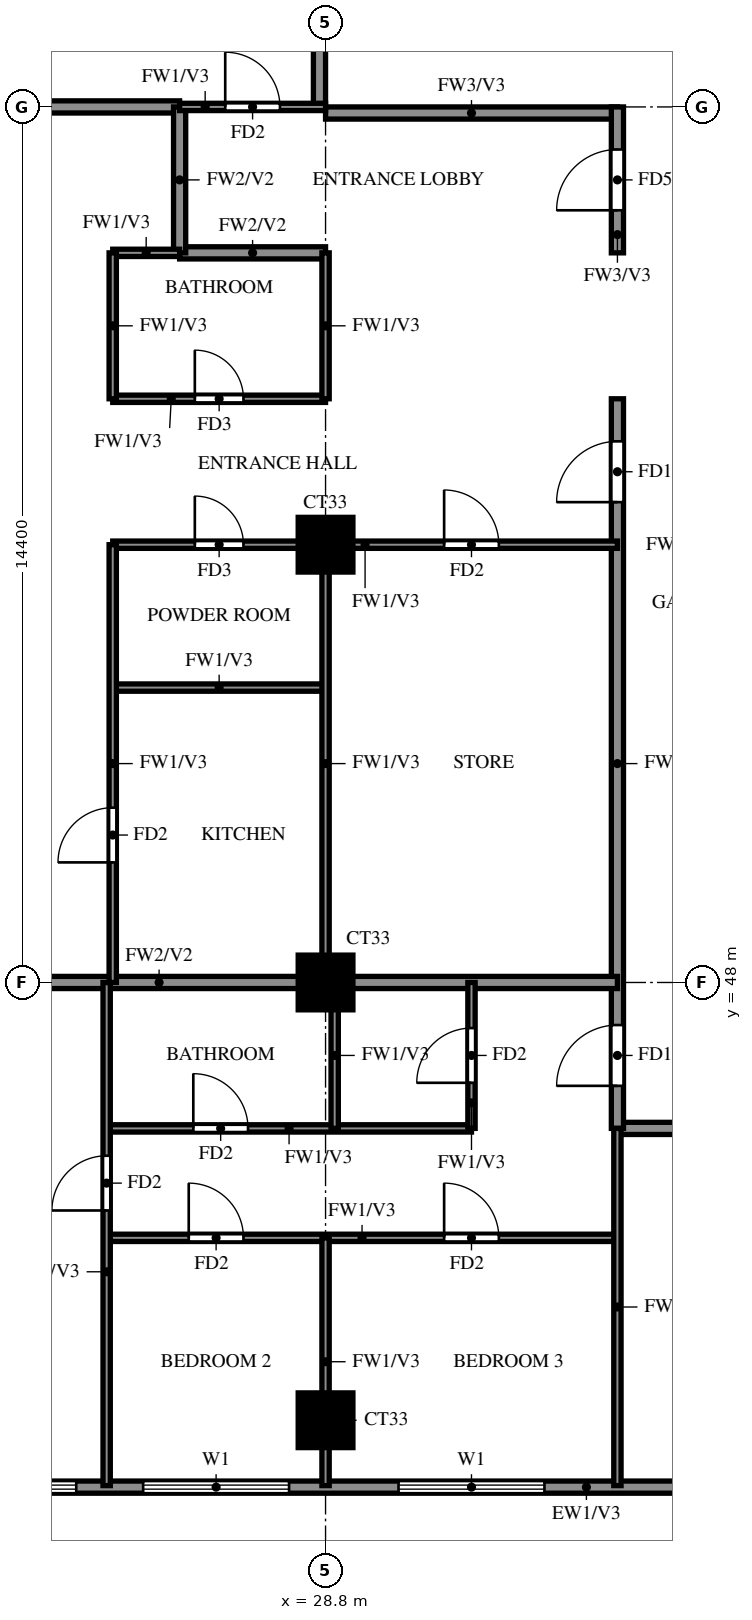
"""IFC4 building model, lengths in metres.
Left out: names, types, materials, properties, quantities, classifications, styles, units other than length and angle.
Written with IfcOpenShell. Run it as: python <this file> out.ifc"""

import sys

from ifc_helpers import new_model, si_unit, direction, frame, frame_2d, origin, origin_2d, place, context, subcontext, project, spatial, rectangle, extrude, source, transform, mapped, element, fill, save


model = new_model("IFC4")
c1 = context("Model", 3, precision=1e-05, world=origin(), true_north=direction((0.0, 1.0)))
c2 = subcontext(c1, "Body", "Model", "MODEL_VIEW")
j1 = project(units=[si_unit("LENGTHUNIT", "METRE"), si_unit("PLANEANGLEUNIT", "RADIAN")], contexts=[c1])
p1 = place(None, origin())
s1 = spatial("IfcSite", under=j1, at=p1, CompositionType="ELEMENT")
p2 = place(p1, origin())
s2 = spatial("IfcBuilding", under=s1, at=p2, CompositionType="ELEMENT")
p3 = place(p2, frame((0.0, 0.0, 229.0)))
s3 = spatial("IfcBuildingStorey", under=s2, at=p3, CompositionType="ELEMENT", Elevation=229.0)
m1 = source(origin(), c2, "Body", "SweptSolid", [
    extrude(rectangle(XDim=0.9, YDim=0.9, at=origin_2d()), origin(), (0.0, 0.0, 1.0), 3.22),
])
for number, where, z_axis, x_axis in (
    (1, (28.8, 40.8, 0.0), (0.0, 0.0, 1.0), (1.0, 0.0, 0.0)),
    (2, (28.8, 48.0, 0.0), (0.0, 0.0, 1.0), (1.0, 0.0, 0.0)),
    (3, (28.8, 55.2, 0.0), (0.0, 0.0, 1.0), (1.0, 0.0, 0.0)),
):
    element("IfcColumn", number, at=place(p3, frame(where, z_axis=z_axis, x_axis=x_axis)), inside=s3, PredefinedType="COLUMN", context=c2, shape_type="MappedRepresentation", body=[
        mapped(m1, transform((0.0, 0.0, 0.0))),
    ])
p4 = place(p3, frame((22.2, 39.7, 0.0), z_axis=(0.0, 0.0, 1.0), x_axis=(1.0, 0.0, 0.0)))
e4 = element("IfcWall", 4, at=p4, inside=s3, PredefinedType="SOLIDWALL", context=c2, shape_type="SweptSolid", body=[
    extrude(rectangle(XDim=19.8, YDim=0.2, at=frame_2d((9.9, 0.0))), origin(), (0.0, 0.0, 1.0), 3.22),
])
p5 = place(p4, frame((0.7, 0.0, 0.6)))
e5 = element("IfcOpeningElement", 5, at=p5, cuts=e4, PredefinedType="OPENING", context=c2, shape_type="SweptSolid", body=[
    extrude(rectangle(XDim=1.8, YDim=2.4, at=frame_2d((0.9, 1.2))), frame((0.0, 0.11, 0.0), z_axis=(0.0, -1.0, 0.0), x_axis=(1.0, 0.0, 0.0)), (0.0, 0.0, 1.0), 0.22),
])
p6 = place(p4, frame((3.6, 0.0, 0.6)))
e6 = element("IfcOpeningElement", 6, at=p6, cuts=e4, PredefinedType="OPENING", context=c2, shape_type="SweptSolid", body=[
    extrude(rectangle(XDim=2.4, YDim=2.4, at=frame_2d((1.2, 1.2))), frame((0.0, 0.11, 0.0), z_axis=(0.0, -1.0, 0.0), x_axis=(1.0, 0.0, 0.0)), (0.0, 0.0, 1.0), 0.22),
])
p7 = place(p4, frame((7.8, 0.0, 0.6)))
e7 = element("IfcOpeningElement", 7, at=p7, cuts=e4, PredefinedType="OPENING", context=c2, shape_type="SweptSolid", body=[
    extrude(rectangle(XDim=2.4, YDim=2.4, at=frame_2d((1.2, 1.2))), frame((0.0, 0.11, 0.0), z_axis=(0.0, -1.0, 0.0), x_axis=(1.0, 0.0, 0.0)), (0.0, 0.0, 1.0), 0.22),
])
p8 = place(p3, frame((33.6, 45.6, 0.0), z_axis=(0.0, 0.0, 1.0), x_axis=(1.0, 0.0, 0.0)))
e8 = element("IfcWall", 8, at=p8, inside=s3, PredefinedType="SOLIDWALL", context=c2, shape_type="SweptSolid", body=[
    extrude(rectangle(XDim=7.2, YDim=0.2, at=frame_2d((3.6, 0.0))), origin(), (0.0, 0.0, 1.0), 3.22),
])
p9 = place(p8, frame((3.15, 0.0, 0.0)))
e9 = element("IfcOpeningElement", 9, at=p9, cuts=e8, PredefinedType="OPENING", context=c2, shape_type="SweptSolid", body=[
    extrude(rectangle(XDim=0.9, YDim=2.1, at=frame_2d((0.45, 1.05))), frame((0.0, 0.11, 0.0), z_axis=(0.0, -1.0, 0.0), x_axis=(1.0, 0.0, 0.0)), (0.0, 0.0, 1.0), 0.22),
])
p10 = place(p3, frame((28.8, 62.3, 0.0), z_axis=(0.0, 0.0, 1.0), x_axis=(1.0, 0.0, 0.0)))
e10 = element("IfcWall", 10, at=p10, inside=s3, PredefinedType="SOLIDWALL", context=c2, shape_type="SweptSolid", body=[
    extrude(rectangle(XDim=4.8, YDim=0.2, at=frame_2d((2.4, 0.0))), origin(), (0.0, 0.0, 1.0), 3.22),
])
p11 = place(p3, frame((28.7, 62.4, 0.0), z_axis=(0.0, 0.0, 1.0), x_axis=(0.0, 1.0, 0.0)))
e11 = element("IfcWall", 11, at=p11, inside=s3, PredefinedType="SOLIDWALL", context=c2, shape_type="SweptSolid", body=[
    extrude(rectangle(XDim=15.6, YDim=0.2, at=frame_2d((7.8, 0.0))), origin(), (0.0, 0.0, 1.0), 3.22),
])
p12 = place(p3, frame((33.6, 45.6, 0.0), z_axis=(0.0, 0.0, 1.0), x_axis=(0.0, 1.0, 0.0)))
e12 = element("IfcWall", 12, at=p12, inside=s3, PredefinedType="SOLIDWALL", context=c2, shape_type="SweptSolid", body=[
    extrude(rectangle(XDim=12.0, YDim=0.2, at=frame_2d((6.0, 0.0))), origin(), (0.0, 0.0, 1.0), 3.22),
])
p13 = place(p12, frame((0.7, 0.0, 0.0)))
e13 = element("IfcOpeningElement", 13, at=p13, cuts=e12, PredefinedType="OPENING", context=c2, shape_type="SweptSolid", body=[
    extrude(rectangle(XDim=1.0, YDim=2.1, at=frame_2d((0.5, 1.05))), frame((0.0, 0.11, 0.0), z_axis=(0.0, -1.0, 0.0), x_axis=(1.0, 0.0, 0.0)), (0.0, 0.0, 1.0), 0.22),
])
p14 = place(p12, frame((10.3, 0.0, 0.0)))
e14 = element("IfcOpeningElement", 14, at=p14, cuts=e12, PredefinedType="OPENING", context=c2, shape_type="SweptSolid", body=[
    extrude(rectangle(XDim=1.0, YDim=2.1, at=frame_2d((0.5, 1.05))), frame((0.0, 0.11, 0.0), z_axis=(0.0, -1.0, 0.0), x_axis=(1.0, 0.0, 0.0)), (0.0, 0.0, 1.0), 0.22),
])
p15 = place(p3, frame((33.6, 60.0, 0.0), z_axis=(0.0, 0.0, 1.0), x_axis=(0.0, 1.0, 0.0)))
e15 = element("IfcWall", 15, at=p15, inside=s3, PredefinedType="SOLIDWALL", context=c2, shape_type="SweptSolid", body=[
    extrude(rectangle(XDim=2.4, YDim=0.2, at=frame_2d((1.2, 0.0))), origin(), (0.0, 0.0, 1.0), 3.22),
])
p16 = place(p15, frame((0.7, 0.0, 0.0)))
e16 = element("IfcOpeningElement", 16, at=p16, cuts=e15, PredefinedType="OPENING", context=c2, shape_type="SweptSolid", body=[
    extrude(rectangle(XDim=1.0, YDim=2.1, at=frame_2d((0.5, 1.05))), frame((0.0, 0.11, 0.0), z_axis=(0.0, -1.0, 0.0), x_axis=(1.0, 0.0, 0.0)), (0.0, 0.0, 1.0), 0.22),
])
p17 = place(p3, frame((18.525, 48.0, 0.0), z_axis=(0.0, 0.0, 1.0), x_axis=(1.0, 0.0, 0.0)))
e17 = element("IfcWall", 17, at=p17, inside=s3, PredefinedType="SOLIDWALL", context=c2, shape_type="SweptSolid", body=[
    extrude(rectangle(XDim=15.075, YDim=0.2, at=frame_2d((7.538, 0.0))), origin(), (0.0, 0.0, 1.0), 3.22),
])
p18 = place(p3, frame((26.4, 60.0, 0.0), z_axis=(0.0, 0.0, 1.0), x_axis=(1.0, 0.0, 0.0)))
e18 = element("IfcWall", 18, at=p18, inside=s3, PredefinedType="SOLIDWALL", context=c2, shape_type="SweptSolid", body=[
    extrude(rectangle(XDim=2.4, YDim=0.2, at=frame_2d((1.2, 0.0))), origin(), (0.0, 0.0, 1.0), 3.22),
])
p19 = place(p3, frame((18.525, 62.4, 0.0), z_axis=(0.0, 0.0, 1.0), x_axis=(1.0, 0.0, 0.0)))
e19 = element("IfcWall", 19, at=p19, inside=s3, PredefinedType="SOLIDWALL", context=c2, shape_type="SweptSolid", body=[
    extrude(rectangle(XDim=7.875, YDim=0.2, at=frame_2d((3.938, 0.0))), origin(), (0.0, 0.0, 1.0), 3.22),
])
p20 = place(p3, frame((26.4, 60.0, 0.0), z_axis=(0.0, 0.0, 1.0), x_axis=(0.0, 1.0, 0.0)))
e20 = element("IfcWall", 20, at=p20, inside=s3, PredefinedType="SOLIDWALL", context=c2, shape_type="SweptSolid", body=[
    extrude(rectangle(XDim=2.4, YDim=0.2, at=frame_2d((1.2, 0.0))), origin(), (0.0, 0.0, 1.0), 3.22),
])
p21 = place(p3, frame((25.2, 43.8, 0.0), z_axis=(0.0, 0.0, 1.0), x_axis=(1.0, 0.0, 0.0)))
e21 = element("IfcWall", 21, at=p21, inside=s3, PredefinedType="PARTITIONING", context=c2, shape_type="SweptSolid", body=[
    extrude(rectangle(XDim=8.4, YDim=0.12, at=frame_2d((4.2, 0.0))), origin(), (0.0, 0.0, 1.0), 3.22),
])
p22 = place(p21, frame((1.35, 0.0, 0.0)))
e22 = element("IfcOpeningElement", 22, at=p22, cuts=e21, PredefinedType="OPENING", context=c2, shape_type="SweptSolid", body=[
    extrude(rectangle(XDim=0.9, YDim=2.1, at=frame_2d((0.45, 1.05))), frame((0.0, 0.07, 0.0), z_axis=(0.0, -1.0, 0.0), x_axis=(1.0, 0.0, 0.0)), (0.0, 0.0, 1.0), 0.14),
])
p23 = place(p21, frame((5.55, 0.0, 0.0)))
e23 = element("IfcOpeningElement", 23, at=p23, cuts=e21, PredefinedType="OPENING", context=c2, shape_type="SweptSolid", body=[
    extrude(rectangle(XDim=0.9, YDim=2.1, at=frame_2d((0.45, 1.05))), frame((0.0, 0.07, 0.0), z_axis=(0.0, -1.0, 0.0), x_axis=(1.0, 0.0, 0.0)), (0.0, 0.0, 1.0), 0.14),
])
p24 = place(p3, frame((25.2, 45.6, 0.0), z_axis=(0.0, 0.0, 1.0), x_axis=(1.0, 0.0, 0.0)))
e24 = element("IfcWall", 24, at=p24, inside=s3, PredefinedType="PARTITIONING", context=c2, shape_type="SweptSolid", body=[
    extrude(rectangle(XDim=6.0, YDim=0.12, at=frame_2d((3.0, 0.0))), origin(), (0.0, 0.0, 1.0), 3.22),
])
p25 = place(p24, frame((1.425, 0.0, 0.0)))
e25 = element("IfcOpeningElement", 25, at=p25, cuts=e24, PredefinedType="OPENING", context=c2, shape_type="SweptSolid", body=[
    extrude(rectangle(XDim=0.9, YDim=2.1, at=frame_2d((0.45, 1.05))), frame((0.0, 0.07, 0.0), z_axis=(0.0, -1.0, 0.0), x_axis=(1.0, 0.0, 0.0)), (0.0, 0.0, 1.0), 0.14),
])
p26 = place(p3, frame((25.3, 52.85, 0.0), z_axis=(0.0, 0.0, 1.0), x_axis=(1.0, 0.0, 0.0)))
e26 = element("IfcWall", 26, at=p26, inside=s3, PredefinedType="PARTITIONING", context=c2, shape_type="SweptSolid", body=[
    extrude(rectangle(XDim=3.5, YDim=0.12, at=frame_2d((1.75, 0.0))), origin(), (0.0, 0.0, 1.0), 3.22),
])
p27 = place(p3, frame((25.3, 55.2, 0.0), z_axis=(0.0, 0.0, 1.0), x_axis=(1.0, 0.0, 0.0)))
e27 = element("IfcWall", 27, at=p27, inside=s3, PredefinedType="PARTITIONING", context=c2, shape_type="SweptSolid", body=[
    extrude(rectangle(XDim=8.3, YDim=0.12, at=frame_2d((4.15, 0.0))), origin(), (0.0, 0.0, 1.0), 3.22),
])
p28 = place(p27, frame((1.35, 0.0, 0.0)))
e28 = element("IfcOpeningElement", 28, at=p28, cuts=e27, PredefinedType="OPENING", context=c2, shape_type="SweptSolid", body=[
    extrude(rectangle(XDim=0.8, YDim=2.1, at=frame_2d((0.4, 1.05))), frame((0.0, 0.07, 0.0), z_axis=(0.0, -1.0, 0.0), x_axis=(1.0, 0.0, 0.0)), (0.0, 0.0, 1.0), 0.14),
])
p29 = place(p27, frame((5.45, 0.0, 0.0)))
e29 = element("IfcOpeningElement", 29, at=p29, cuts=e27, PredefinedType="OPENING", context=c2, shape_type="SweptSolid", body=[
    extrude(rectangle(XDim=0.9, YDim=2.1, at=frame_2d((0.45, 1.05))), frame((0.0, 0.07, 0.0), z_axis=(0.0, -1.0, 0.0), x_axis=(1.0, 0.0, 0.0)), (0.0, 0.0, 1.0), 0.14),
])
p30 = place(p3, frame((25.3, 57.6, 0.0), z_axis=(0.0, 0.0, 1.0), x_axis=(1.0, 0.0, 0.0)))
e30 = element("IfcWall", 30, at=p30, inside=s3, PredefinedType="PARTITIONING", context=c2, shape_type="SweptSolid", body=[
    extrude(rectangle(XDim=3.5, YDim=0.12, at=frame_2d((1.75, 0.0))), origin(), (0.0, 0.0, 1.0), 3.22),
])
p31 = place(p30, frame((1.35, 0.0, 0.0)))
e31 = element("IfcOpeningElement", 31, at=p31, cuts=e30, PredefinedType="OPENING", context=c2, shape_type="SweptSolid", body=[
    extrude(rectangle(XDim=0.8, YDim=2.1, at=frame_2d((0.4, 1.05))), frame((0.0, 0.07, 0.0), z_axis=(0.0, -1.0, 0.0), x_axis=(1.0, 0.0, 0.0)), (0.0, 0.0, 1.0), 0.14),
])
p32 = place(p3, frame((25.3, 60.0, 0.0), z_axis=(0.0, 0.0, 1.0), x_axis=(1.0, 0.0, 0.0)))
e32 = element("IfcWall", 32, at=p32, inside=s3, PredefinedType="PARTITIONING", context=c2, shape_type="SweptSolid", body=[
    extrude(rectangle(XDim=1.1, YDim=0.12, at=frame_2d((0.55, 0.0))), origin(), (0.0, 0.0, 1.0), 3.22),
])
p33 = place(p3, frame((26.4, 62.4, 0.0), z_axis=(0.0, 0.0, 1.0), x_axis=(1.0, 0.0, 0.0)))
e33 = element("IfcWall", 33, at=p33, inside=s3, PredefinedType="PARTITIONING", context=c2, shape_type="SweptSolid", body=[
    extrude(rectangle(XDim=2.4, YDim=0.12, at=frame_2d((1.2, 0.0))), origin(), (0.0, 0.0, 1.0), 3.22),
])
p34 = place(p33, frame((0.75, 0.0, 0.0)))
e34 = element("IfcOpeningElement", 34, at=p34, cuts=e33, PredefinedType="OPENING", context=c2, shape_type="SweptSolid", body=[
    extrude(rectangle(XDim=0.9, YDim=2.1, at=frame_2d((0.45, 1.05))), frame((0.0, 0.07, 0.0), z_axis=(0.0, -1.0, 0.0), x_axis=(1.0, 0.0, 0.0)), (0.0, 0.0, 1.0), 0.14),
])
p35 = place(p3, frame((25.2, 39.725, 0.0), z_axis=(0.0, 0.0, 1.0), x_axis=(0.0, 1.0, 0.0)))
e35 = element("IfcWall", 35, at=p35, inside=s3, PredefinedType="PARTITIONING", context=c2, shape_type="SweptSolid", body=[
    extrude(rectangle(XDim=8.275, YDim=0.12, at=frame_2d((4.137, 0.0))), origin(), (0.0, 0.0, 1.0), 3.22),
])
p36 = place(p35, frame((4.525, 0.0, 0.0)))
e36 = element("IfcOpeningElement", 36, at=p36, cuts=e35, PredefinedType="OPENING", context=c2, shape_type="SweptSolid", body=[
    extrude(rectangle(XDim=0.9, YDim=2.1, at=frame_2d((0.45, 1.05))), frame((0.0, 0.07, 0.0), z_axis=(0.0, -1.0, 0.0), x_axis=(1.0, 0.0, 0.0)), (0.0, 0.0, 1.0), 0.14),
])
p37 = place(p3, frame((25.3, 48.0, 0.0), z_axis=(0.0, 0.0, 1.0), x_axis=(0.0, 1.0, 0.0)))
e37 = element("IfcWall", 37, at=p37, inside=s3, PredefinedType="PARTITIONING", context=c2, shape_type="SweptSolid", body=[
    extrude(rectangle(XDim=7.2, YDim=0.12, at=frame_2d((3.6, 0.0))), origin(), (0.0, 0.0, 1.0), 3.22),
])
p38 = place(p37, frame((1.975, 0.0, 0.0)))
e38 = element("IfcOpeningElement", 38, at=p38, cuts=e37, PredefinedType="OPENING", context=c2, shape_type="SweptSolid", body=[
    extrude(rectangle(XDim=0.9, YDim=2.1, at=frame_2d((0.45, 1.05))), frame((0.0, 0.07, 0.0), z_axis=(0.0, -1.0, 0.0), x_axis=(1.0, 0.0, 0.0)), (0.0, 0.0, 1.0), 0.14),
])
p39 = place(p3, frame((25.3, 57.6, 0.0), z_axis=(0.0, 0.0, 1.0), x_axis=(0.0, 1.0, 0.0)))
e39 = element("IfcWall", 39, at=p39, inside=s3, PredefinedType="PARTITIONING", context=c2, shape_type="SweptSolid", body=[
    extrude(rectangle(XDim=2.4, YDim=0.12, at=frame_2d((1.2, 0.0))), origin(), (0.0, 0.0, 1.0), 3.22),
])
p40 = place(p3, frame((28.8, 39.725, 0.0), z_axis=(0.0, 0.0, 1.0), x_axis=(0.0, 1.0, 0.0)))
e40 = element("IfcWall", 40, at=p40, inside=s3, PredefinedType="PARTITIONING", context=c2, shape_type="SweptSolid", body=[
    extrude(rectangle(XDim=4.075, YDim=0.12, at=frame_2d((2.038, 0.0))), origin(), (0.0, 0.0, 1.0), 3.22),
])
p41 = place(p3, frame((28.8, 48.0, 0.0), z_axis=(0.0, 0.0, 1.0), x_axis=(0.0, 1.0, 0.0)))
e41 = element("IfcWall", 41, at=p41, inside=s3, PredefinedType="PARTITIONING", context=c2, shape_type="SweptSolid", body=[
    extrude(rectangle(XDim=7.2, YDim=0.12, at=frame_2d((3.6, 0.0))), origin(), (0.0, 0.0, 1.0), 3.22),
])
for number, where, z_axis, x_axis in (
    (42, (28.8, 57.6, 0.0), (0.0, 0.0, 1.0), (0.0, 1.0, 0.0)),
    (43, (28.95, 45.6, 0.0), (0.0, 0.0, 1.0), (0.0, 1.0, 0.0)),
):
    element("IfcWall", number, at=place(p3, frame(where, z_axis=z_axis, x_axis=x_axis)), inside=s3, PredefinedType="PARTITIONING", context=c2, shape_type="SweptSolid", body=[
        extrude(rectangle(XDim=2.4, YDim=0.12, at=frame_2d((1.2, 0.0))), origin(), (0.0, 0.0, 1.0), 3.22),
    ])
p42 = place(p3, frame((31.2, 45.6, 0.0), z_axis=(0.0, 0.0, 1.0), x_axis=(0.0, 1.0, 0.0)))
e44 = element("IfcWall", 44, at=p42, inside=s3, PredefinedType="PARTITIONING", context=c2, shape_type="SweptSolid", body=[
    extrude(rectangle(XDim=2.4, YDim=0.12, at=frame_2d((1.2, 0.0))), origin(), (0.0, 0.0, 1.0), 3.22),
])
p43 = place(p42, frame((0.75, 0.0, 0.0)))
e45 = element("IfcOpeningElement", 45, at=p43, cuts=e44, PredefinedType="OPENING", context=c2, shape_type="SweptSolid", body=[
    extrude(rectangle(XDim=0.9, YDim=2.1, at=frame_2d((0.45, 1.05))), frame((0.0, 0.07, 0.0), z_axis=(0.0, -1.0, 0.0), x_axis=(1.0, 0.0, 0.0)), (0.0, 0.0, 1.0), 0.14),
])
p44 = place(p3, frame((33.6, 39.725, 0.0), z_axis=(0.0, 0.0, 1.0), x_axis=(0.0, 1.0, 0.0)))
e46 = element("IfcWall", 46, at=p44, inside=s3, PredefinedType="PARTITIONING", context=c2, shape_type="SweptSolid", body=[
    extrude(rectangle(XDim=5.875, YDim=0.12, at=frame_2d((2.938, 0.0))), origin(), (0.0, 0.0, 1.0), 3.22),
])
p45 = place(p5, origin())
e47 = element("IfcWindow", 47, at=p45, inside=s3, PartitioningType="DOUBLE_PANEL_VERTICAL", PredefinedType="WINDOW", context=c2, shape_type="SweptSolid", body=[
    extrude(rectangle(XDim=1.8, YDim=2.4, at=frame_2d((0.9, 1.2))), frame((0.0, 0.03, 0.0), z_axis=(0.0, -1.0, 0.0), x_axis=(1.0, 0.0, 0.0)), (0.0, 0.0, 1.0), 0.06),
])
fill(e5, e47)
p46 = place(p6, origin())
e48 = element("IfcWindow", 48, at=p46, inside=s3, PartitioningType="DOUBLE_PANEL_VERTICAL", PredefinedType="WINDOW", context=c2, shape_type="SweptSolid", body=[
    extrude(rectangle(XDim=2.4, YDim=2.4, at=frame_2d((1.2, 1.2))), frame((0.0, 0.03, 0.0), z_axis=(0.0, -1.0, 0.0), x_axis=(1.0, 0.0, 0.0)), (0.0, 0.0, 1.0), 0.06),
])
fill(e6, e48)
p47 = place(p7, origin())
e49 = element("IfcWindow", 49, at=p47, inside=s3, PartitioningType="DOUBLE_PANEL_VERTICAL", PredefinedType="WINDOW", context=c2, shape_type="SweptSolid", body=[
    extrude(rectangle(XDim=2.4, YDim=2.4, at=frame_2d((1.2, 1.2))), frame((0.0, 0.03, 0.0), z_axis=(0.0, -1.0, 0.0), x_axis=(1.0, 0.0, 0.0)), (0.0, 0.0, 1.0), 0.06),
])
fill(e7, e49)
p48 = place(p13, origin())
e50 = element("IfcDoor", 50, at=p48, inside=s3, OperationType="SINGLE_SWING_LEFT", PredefinedType="DOOR", context=c2, shape_type="SweptSolid", body=[
    extrude(rectangle(XDim=1.0, YDim=2.1, at=frame_2d((0.5, 1.05))), frame((0.0, 0.025, 0.0), z_axis=(0.0, -1.0, 0.0), x_axis=(1.0, 0.0, 0.0)), (0.0, 0.0, 1.0), 0.05),
])
fill(e13, e50)
p49 = place(p36, origin())
e51 = element("IfcDoor", 51, at=p49, inside=s3, OperationType="SINGLE_SWING_LEFT", PredefinedType="DOOR", context=c2, shape_type="SweptSolid", body=[
    extrude(rectangle(XDim=0.9, YDim=2.1, at=frame_2d((0.45, 1.05))), frame((0.0, 0.025, 0.0), z_axis=(0.0, -1.0, 0.0), x_axis=(1.0, 0.0, 0.0)), (0.0, 0.0, 1.0), 0.05),
])
fill(e36, e51)
p50 = place(p22, origin())
e52 = element("IfcDoor", 52, at=p50, inside=s3, OperationType="SINGLE_SWING_RIGHT", PredefinedType="DOOR", context=c2, shape_type="SweptSolid", body=[
    extrude(rectangle(XDim=0.9, YDim=2.1, at=frame_2d((0.45, 1.05))), frame((0.0, 0.025, 0.0), z_axis=(0.0, -1.0, 0.0), x_axis=(1.0, 0.0, 0.0)), (0.0, 0.0, 1.0), 0.05),
])
fill(e22, e52)
p51 = place(p23, origin())
e53 = element("IfcDoor", 53, at=p51, inside=s3, OperationType="SINGLE_SWING_LEFT", PredefinedType="DOOR", context=c2, shape_type="SweptSolid", body=[
    extrude(rectangle(XDim=0.9, YDim=2.1, at=frame_2d((0.45, 1.05))), frame((0.0, 0.025, 0.0), z_axis=(0.0, -1.0, 0.0), x_axis=(1.0, 0.0, 0.0)), (0.0, 0.0, 1.0), 0.05),
])
fill(e23, e53)
p52 = place(p25, origin())
e54 = element("IfcDoor", 54, at=p52, inside=s3, OperationType="SINGLE_SWING_LEFT", PredefinedType="DOOR", context=c2, shape_type="SweptSolid", body=[
    extrude(rectangle(XDim=0.9, YDim=2.1, at=frame_2d((0.45, 1.05))), frame((0.0, 0.025, 0.0), z_axis=(0.0, -1.0, 0.0), x_axis=(1.0, 0.0, 0.0)), (0.0, 0.0, 1.0), 0.05),
])
fill(e25, e54)
p53 = place(p43, origin())
e55 = element("IfcDoor", 55, at=p53, inside=s3, OperationType="SINGLE_SWING_RIGHT", PredefinedType="DOOR", context=c2, shape_type="SweptSolid", body=[
    extrude(rectangle(XDim=0.9, YDim=2.1, at=frame_2d((0.45, 1.05))), frame((0.0, 0.025, 0.0), z_axis=(0.0, -1.0, 0.0), x_axis=(1.0, 0.0, 0.0)), (0.0, 0.0, 1.0), 0.05),
])
fill(e45, e55)
p54 = place(p14, origin())
e56 = element("IfcDoor", 56, at=p54, inside=s3, OperationType="SINGLE_SWING_LEFT", PredefinedType="DOOR", context=c2, shape_type="SweptSolid", body=[
    extrude(rectangle(XDim=1.0, YDim=2.1, at=frame_2d((0.5, 1.05))), frame((0.0, 0.025, 0.0), z_axis=(0.0, -1.0, 0.0), x_axis=(1.0, 0.0, 0.0)), (0.0, 0.0, 1.0), 0.05),
])
fill(e14, e56)
p55 = place(p38, origin())
e57 = element("IfcDoor", 57, at=p55, inside=s3, OperationType="SINGLE_SWING_RIGHT", PredefinedType="DOOR", context=c2, shape_type="SweptSolid", body=[
    extrude(rectangle(XDim=0.9, YDim=2.1, at=frame_2d((0.45, 1.05))), frame((0.0, 0.025, 0.0), z_axis=(0.0, -1.0, 0.0), x_axis=(1.0, 0.0, 0.0)), (0.0, 0.0, 1.0), 0.05),
])
fill(e38, e57)
p56 = place(p28, origin())
e58 = element("IfcDoor", 58, at=p56, inside=s3, OperationType="SINGLE_SWING_LEFT", PredefinedType="DOOR", context=c2, shape_type="SweptSolid", body=[
    extrude(rectangle(XDim=0.8, YDim=2.1, at=frame_2d((0.4, 1.05))), frame((0.0, 0.025, 0.0), z_axis=(0.0, -1.0, 0.0), x_axis=(1.0, 0.0, 0.0)), (0.0, 0.0, 1.0), 0.05),
])
fill(e28, e58)
p57 = place(p31, origin())
e59 = element("IfcDoor", 59, at=p57, inside=s3, OperationType="SINGLE_SWING_LEFT", PredefinedType="DOOR", context=c2, shape_type="SweptSolid", body=[
    extrude(rectangle(XDim=0.8, YDim=2.1, at=frame_2d((0.4, 1.05))), frame((0.0, 0.025, 0.0), z_axis=(0.0, -1.0, 0.0), x_axis=(1.0, 0.0, 0.0)), (0.0, 0.0, 1.0), 0.05),
])
fill(e31, e59)
p58 = place(p29, origin())
e60 = element("IfcDoor", 60, at=p58, inside=s3, OperationType="SINGLE_SWING_RIGHT", PredefinedType="DOOR", context=c2, shape_type="SweptSolid", body=[
    extrude(rectangle(XDim=0.9, YDim=2.1, at=frame_2d((0.45, 1.05))), frame((0.0, 0.025, 0.0), z_axis=(0.0, -1.0, 0.0), x_axis=(1.0, 0.0, 0.0)), (0.0, 0.0, 1.0), 0.05),
])
fill(e29, e60)
p59 = place(p34, origin())
e61 = element("IfcDoor", 61, at=p59, inside=s3, OperationType="SINGLE_SWING_RIGHT", PredefinedType="DOOR", context=c2, shape_type="SweptSolid", body=[
    extrude(rectangle(XDim=0.9, YDim=2.1, at=frame_2d((0.45, 1.05))), frame((0.0, 0.025, 0.0), z_axis=(0.0, -1.0, 0.0), x_axis=(1.0, 0.0, 0.0)), (0.0, 0.0, 1.0), 0.05),
])
fill(e34, e61)
p60 = place(p16, origin())
e62 = element("IfcDoor", 62, at=p60, inside=s3, OperationType="SINGLE_SWING_LEFT", PredefinedType="DOOR", context=c2, shape_type="SweptSolid", body=[
    extrude(rectangle(XDim=1.0, YDim=2.1, at=frame_2d((0.5, 1.05))), frame((0.0, 0.025, 0.0), z_axis=(0.0, -1.0, 0.0), x_axis=(1.0, 0.0, 0.0)), (0.0, 0.0, 1.0), 0.05),
])
fill(e16, e62)
save(model, sys.argv[1])
